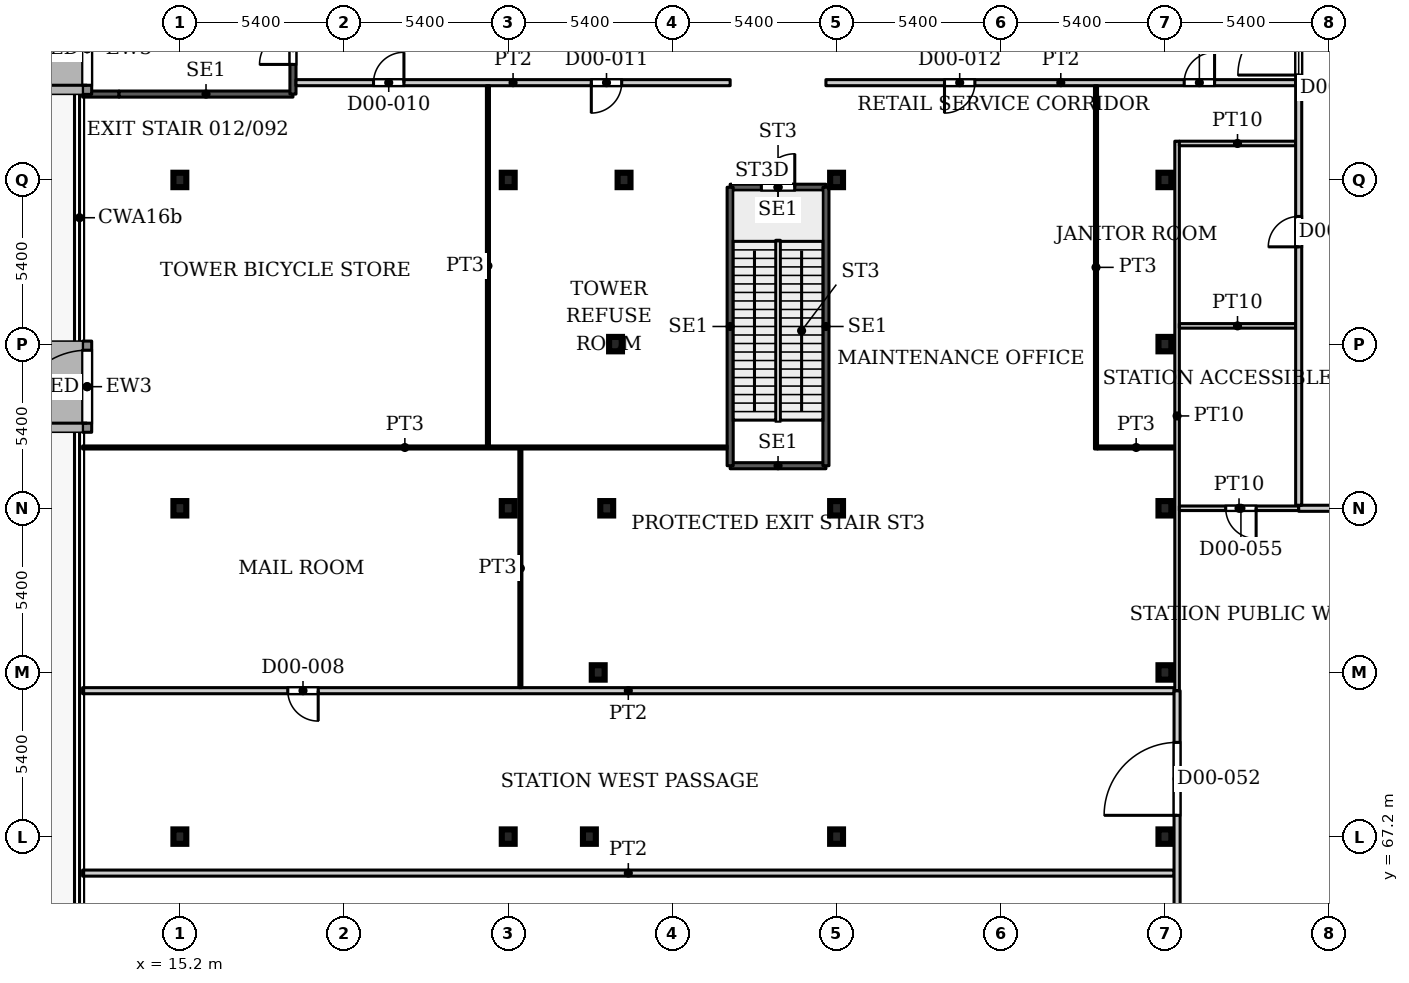
"""IFC4 building model, lengths in metres.
Left out: names, types, materials, properties, quantities, classifications, styles, units other than length and angle.
Written with IfcOpenShell. Run it as: python <this file> out.ifc"""

import sys

from ifc_helpers import new_model, si_unit, direction, frame, frame_2d, origin, origin_2d, place, context, subcontext, project, spatial, rectangle, i_section, extrude, source, transform, mapped, element, fill, save


model = new_model("IFC4")
c1 = context("Model", 3, precision=1e-05, world=origin(), true_north=direction((0.0, 1.0)))
c2 = subcontext(c1, "Body", "Model", "MODEL_VIEW")
j1 = project(units=[si_unit("LENGTHUNIT", "METRE"), si_unit("PLANEANGLEUNIT", "RADIAN")], contexts=[c1])
p1 = place(None, origin())
s1 = spatial("IfcSite", under=j1, at=p1, CompositionType="ELEMENT")
p2 = place(p1, origin())
s2 = spatial("IfcBuilding", under=s1, at=p2, CompositionType="ELEMENT")
p3 = place(p2, origin())
s3 = spatial("IfcBuildingStorey", under=s2, at=p3, CompositionType="ELEMENT", Elevation=0.0)
for number, where, z_axis, x_axis in (
    (1, (15.2, 67.2, 0.0), (0.0, 0.0, 1.0), (1.0, 0.0, 0.0)),
    (2, (26.0, 67.2, 0.0), (0.0, 0.0, 1.0), (1.0, 0.0, 0.0)),
    (3, (36.8, 67.2, 0.0), (0.0, 0.0, 1.0), (1.0, 0.0, 0.0)),
    (4, (47.6, 67.2, 0.0), (0.0, 0.0, 1.0), (1.0, 0.0, 0.0)),
    (5, (15.2, 78.0, 0.0), (0.0, 0.0, 1.0), (1.0, 0.0, 0.0)),
    (6, (26.0, 78.0, 0.0), (0.0, 0.0, 1.0), (1.0, 0.0, 0.0)),
    (7, (36.8, 78.0, 0.0), (0.0, 0.0, 1.0), (1.0, 0.0, 0.0)),
    (8, (47.6, 78.0, 0.0), (0.0, 0.0, 1.0), (1.0, 0.0, 0.0)),
    (9, (15.2, 88.8, 0.0), (0.0, 0.0, 1.0), (1.0, 0.0, 0.0)),
    (10, (26.0, 88.8, 0.0), (0.0, 0.0, 1.0), (1.0, 0.0, 0.0)),
    (11, (36.8, 88.8, 0.0), (0.0, 0.0, 1.0), (1.0, 0.0, 0.0)),
    (12, (47.6, 88.8, 0.0), (0.0, 0.0, 1.0), (1.0, 0.0, 0.0)),
    (13, (28.67, 67.2, 0.0), (0.0, 0.0, 1.0), (1.0, 0.0, 0.0)),
    (14, (28.96, 72.6, 0.0), (0.0, 0.0, 1.0), (1.0, 0.0, 0.0)),
    (15, (47.6, 72.6, 0.0), (0.0, 0.0, 1.0), (1.0, 0.0, 0.0)),
    (16, (29.24, 78.0, 0.0), (0.0, 0.0, 1.0), (1.0, 0.0, 0.0)),
    (17, (29.53, 83.4, 0.0), (0.0, 0.0, 1.0), (1.0, 0.0, 0.0)),
    (18, (47.6, 83.4, 0.0), (0.0, 0.0, 1.0), (1.0, 0.0, 0.0)),
    (19, (29.81, 88.8, 0.0), (0.0, 0.0, 1.0), (1.0, 0.0, 0.0)),
):
    element("IfcColumn", number, at=place(p3, frame(where, z_axis=z_axis, x_axis=x_axis)), inside=s3, PredefinedType="COLUMN", context=c2, shape_type="SweptSolid", body=[
        extrude(i_section(OverallWidth=0.424, OverallDepth=0.474, WebThickness=0.048, FlangeThickness=0.077, FilletRadius=0.014, at=origin_2d()), origin(), (0.0, 0.0, 1.0), 7.5),
    ])
p4 = place(p3, frame((12.15, 80.5, 0.0), z_axis=(0.0, 0.0, 1.0), x_axis=(0.0, 1.0, 0.0)))
e20 = element("IfcWall", 20, at=p4, inside=s3, PredefinedType="SOLIDWALL", context=c2, shape_type="SweptSolid", body=[
    extrude(rectangle(XDim=3.0, YDim=0.3, at=frame_2d((1.5, 0.0))), origin(), (0.0, 0.0, 1.0), 7.25),
])
p5 = place(p4, frame((0.3, 0.0, 0.0)))
e21 = element("IfcOpeningElement", 21, at=p5, cuts=e20, PredefinedType="OPENING", context=c2, shape_type="SweptSolid", body=[
    extrude(rectangle(XDim=2.4, YDim=2.7, at=frame_2d((1.2, 1.35))), frame((0.0, 0.16, 0.0), z_axis=(0.0, -1.0, 0.0), x_axis=(1.0, 0.0, 0.0)), (0.0, 0.0, 1.0), 0.32),
])
p6 = place(p3, frame((12.15, 91.615, 0.0), z_axis=(0.0, 0.0, 1.0), x_axis=(0.0, 1.0, 0.0)))
e22 = element("IfcWall", 22, at=p6, inside=s3, PredefinedType="SOLIDWALL", context=c2, shape_type="SweptSolid", body=[
    extrude(rectangle(XDim=3.0, YDim=0.3, at=frame_2d((1.5, 0.0))), origin(), (0.0, 0.0, 1.0), 7.25),
])
p7 = place(p6, frame((0.3, 0.0, 0.0)))
e23 = element("IfcOpeningElement", 23, at=p7, cuts=e22, PredefinedType="OPENING", context=c2, shape_type="SweptSolid", body=[
    extrude(rectangle(XDim=2.4, YDim=2.7, at=frame_2d((1.2, 1.35))), frame((0.0, 0.16, 0.0), z_axis=(0.0, -1.0, 0.0), x_axis=(1.0, 0.0, 0.0)), (0.0, 0.0, 1.0), 0.32),
])
p8 = place(p3, frame((33.3, 79.4, 0.0), z_axis=(0.0, 0.0, 1.0), x_axis=(1.0, 0.0, 0.0)))
e24 = element("IfcWall", 24, at=p8, inside=s3, PredefinedType="SHEAR", context=c2, shape_type="SweptSolid", body=[
    extrude(rectangle(XDim=3.15, YDim=0.2, at=frame_2d((1.575, 0.0))), origin(), (0.0, 0.0, 1.0), 7.5),
])
p9 = place(p3, frame((33.3, 88.56, 0.0), z_axis=(0.0, 0.0, 1.0), x_axis=(1.0, 0.0, 0.0)))
e25 = element("IfcWall", 25, at=p9, inside=s3, PredefinedType="SHEAR", context=c2, shape_type="SweptSolid", body=[
    extrude(rectangle(XDim=3.15, YDim=0.2, at=frame_2d((1.575, 0.0))), origin(), (0.0, 0.0, 1.0), 7.5),
])
p10 = place(p9, frame((1.025, 0.0, 0.0)))
e26 = element("IfcOpeningElement", 26, at=p10, cuts=e25, PredefinedType="OPENING", context=c2, shape_type="SweptSolid", body=[
    extrude(rectangle(XDim=1.1, YDim=2.2, at=frame_2d((0.55, 1.1))), frame((0.0, 0.11, 0.0), z_axis=(0.0, -1.0, 0.0), x_axis=(1.0, 0.0, 0.0)), (0.0, 0.0, 1.0), 0.22),
])
for number, where, z_axis, x_axis in (
    (27, (33.3, 79.4, 0.0), (0.0, 0.0, 1.0), (0.0, 1.0, 0.0)),
    (28, (36.45, 79.4, 0.0), (0.0, 0.0, 1.0), (0.0, 1.0, 0.0)),
):
    element("IfcWall", number, at=place(p3, frame(where, z_axis=z_axis, x_axis=x_axis)), inside=s3, PredefinedType="SHEAR", context=c2, shape_type="SweptSolid", body=[
        extrude(rectangle(XDim=9.16, YDim=0.2, at=frame_2d((4.58, 0.0))), origin(), (0.0, 0.0, 1.0), 7.5),
    ])
p11 = place(p3, frame((12.0, 91.625, 0.0), z_axis=(0.0, 0.0, 1.0), x_axis=(1.0, 0.0, 0.0)))
e29 = element("IfcWall", 29, at=p11, inside=s3, PredefinedType="SHEAR", context=c2, shape_type="SweptSolid", body=[
    extrude(rectangle(XDim=1.2, YDim=0.2, at=frame_2d((0.6, 0.0))), origin(), (0.0, 0.0, 1.0), 7.5),
])
p12 = place(p3, frame((13.2, 91.625, 0.0), z_axis=(0.0, 0.0, 1.0), x_axis=(1.0, 0.0, 0.0)))
e30 = element("IfcWall", 30, at=p12, inside=s3, PredefinedType="SHEAR", context=c2, shape_type="SweptSolid", body=[
    extrude(rectangle(XDim=5.72, YDim=0.2, at=frame_2d((2.86, 0.0))), origin(), (0.0, 0.0, 1.0), 7.5),
])
p13 = place(p3, frame((18.92, 91.625, 0.0), z_axis=(0.0, 0.0, 1.0), x_axis=(0.0, 1.0, 0.0)))
e31 = element("IfcWall", 31, at=p13, inside=s3, PredefinedType="SHEAR", context=c2, shape_type="SweptSolid", body=[
    extrude(rectangle(XDim=3.15, YDim=0.2, at=frame_2d((1.575, 0.0))), origin(), (0.0, 0.0, 1.0), 7.5),
])
p14 = place(p13, frame((0.975, 0.0, 0.0)))
e32 = element("IfcOpeningElement", 32, at=p14, cuts=e31, PredefinedType="OPENING", context=c2, shape_type="SweptSolid", body=[
    extrude(rectangle(XDim=1.1, YDim=2.2, at=frame_2d((0.55, 1.1))), frame((0.0, 0.11, 0.0), z_axis=(0.0, -1.0, 0.0), x_axis=(1.0, 0.0, 0.0)), (0.0, 0.0, 1.0), 0.22),
])
p15 = place(p3, frame((12.0, 66.0, 0.0), z_axis=(0.0, 0.0, 1.0), x_axis=(1.0, 0.0, 0.0)))
e33 = element("IfcWall", 33, at=p15, inside=s3, PredefinedType="PARTITIONING", context=c2, shape_type="SweptSolid", body=[
    extrude(rectangle(XDim=35.9, YDim=0.2, at=frame_2d((17.95, 0.0))), origin(), (0.0, 0.0, 1.0), 7.08),
])
p16 = place(p3, frame((12.0, 72.0, 0.0), z_axis=(0.0, 0.0, 1.0), x_axis=(1.0, 0.0, 0.0)))
e34 = element("IfcWall", 34, at=p16, inside=s3, PredefinedType="PARTITIONING", context=c2, shape_type="SweptSolid", body=[
    extrude(rectangle(XDim=35.9, YDim=0.2, at=frame_2d((17.95, 0.0))), origin(), (0.0, 0.0, 1.0), 7.08),
])
p17 = place(p16, frame((6.75, 0.0, 0.0)))
e35 = element("IfcOpeningElement", 35, at=p17, cuts=e34, PredefinedType="OPENING", context=c2, shape_type="SweptSolid", body=[
    extrude(rectangle(XDim=1.0, YDim=2.1, at=frame_2d((0.5, 1.05))), frame((0.0, 0.11, 0.0), z_axis=(0.0, -1.0, 0.0), x_axis=(1.0, 0.0, 0.0)), (0.0, 0.0, 1.0), 0.22),
])
p18 = place(p3, frame((12.0, 80.0, 0.0), z_axis=(0.0, 0.0, 1.0), x_axis=(1.0, 0.0, 0.0)))
e36 = element("IfcWall", 36, at=p18, inside=s3, PredefinedType="PARTITIONING", context=c2, shape_type="SweptSolid", body=[
    extrude(rectangle(XDim=21.201, YDim=0.1, at=frame_2d((10.601, 0.0))), origin(), (0.0, 0.0, 1.0), 7.08),
])
p19 = place(p3, frame((19.019, 92.0, 0.0), z_axis=(0.0, 0.0, 1.0), x_axis=(1.0, 0.0, 0.0)))
e37 = element("IfcWall", 37, at=p19, inside=s3, PredefinedType="PARTITIONING", context=c2, shape_type="SweptSolid", body=[
    extrude(rectangle(XDim=14.281, YDim=0.2, at=frame_2d((7.141, 0.0))), origin(), (0.0, 0.0, 1.0), 7.08),
])
p20 = place(p19, frame((2.551, 0.0, 0.0)))
e38 = element("IfcOpeningElement", 38, at=p20, cuts=e37, PredefinedType="OPENING", context=c2, shape_type="SweptSolid", body=[
    extrude(rectangle(XDim=1.0, YDim=2.1, at=frame_2d((0.5, 1.05))), frame((0.0, 0.11, 0.0), z_axis=(0.0, -1.0, 0.0), x_axis=(1.0, 0.0, 0.0)), (0.0, 0.0, 1.0), 0.22),
])
p21 = place(p19, frame((9.714, 0.0, 0.0)))
e39 = element("IfcOpeningElement", 39, at=p21, cuts=e37, PredefinedType="OPENING", context=c2, shape_type="SweptSolid", body=[
    extrude(rectangle(XDim=1.0, YDim=2.1, at=frame_2d((0.5, 1.05))), frame((0.0, 0.11, 0.0), z_axis=(0.0, -1.0, 0.0), x_axis=(1.0, 0.0, 0.0)), (0.0, 0.0, 1.0), 0.22),
])
p22 = place(p3, frame((25.333, 80.05, 0.0), z_axis=(0.0, 0.0, 1.0), x_axis=(0.0, 1.0, 0.0)))
e40 = element("IfcWall", 40, at=p22, inside=s3, PredefinedType="PARTITIONING", context=c2, shape_type="SweptSolid", body=[
    extrude(rectangle(XDim=11.85, YDim=0.1, at=frame_2d((5.925, 0.0))), origin(), (0.0, 0.0, 1.0), 7.08),
])
p23 = place(p3, frame((26.4, 72.1, 0.0), z_axis=(0.0, 0.0, 1.0), x_axis=(0.0, 1.0, 0.0)))
e41 = element("IfcWall", 41, at=p23, inside=s3, PredefinedType="PARTITIONING", context=c2, shape_type="SweptSolid", body=[
    extrude(rectangle(XDim=7.85, YDim=0.1, at=frame_2d((3.925, 0.0))), origin(), (0.0, 0.0, 1.0), 7.08),
])
p24 = place(p3, frame((36.45, 92.0, 0.0), z_axis=(0.0, 0.0, 1.0), x_axis=(1.0, 0.0, 0.0)))
e42 = element("IfcWall", 42, at=p24, inside=s3, PredefinedType="PARTITIONING", context=c2, shape_type="SweptSolid", body=[
    extrude(rectangle(XDim=15.45, YDim=0.2, at=frame_2d((7.725, 0.0))), origin(), (0.0, 0.0, 1.0), 7.08),
])
p25 = place(p24, frame((3.9, 0.0, 0.0)))
e43 = element("IfcOpeningElement", 43, at=p25, cuts=e42, PredefinedType="OPENING", context=c2, shape_type="SweptSolid", body=[
    extrude(rectangle(XDim=1.0, YDim=2.1, at=frame_2d((0.5, 1.05))), frame((0.0, 0.11, 0.0), z_axis=(0.0, -1.0, 0.0), x_axis=(1.0, 0.0, 0.0)), (0.0, 0.0, 1.0), 0.22),
])
p26 = place(p24, frame((11.783, 0.0, 0.0)))
e44 = element("IfcOpeningElement", 44, at=p26, cuts=e42, PredefinedType="OPENING", context=c2, shape_type="SweptSolid", body=[
    extrude(rectangle(XDim=1.0, YDim=2.1, at=frame_2d((0.5, 1.05))), frame((0.0, 0.11, 0.0), z_axis=(0.0, -1.0, 0.0), x_axis=(1.0, 0.0, 0.0)), (0.0, 0.0, 1.0), 0.22),
])
p27 = place(p3, frame((45.333, 79.95, 0.0), z_axis=(0.0, 0.0, 1.0), x_axis=(0.0, 1.0, 0.0)))
e45 = element("IfcWall", 45, at=p27, inside=s3, PredefinedType="PARTITIONING", context=c2, shape_type="SweptSolid", body=[
    extrude(rectangle(XDim=11.95, YDim=0.1, at=frame_2d((5.975, 0.0))), origin(), (0.0, 0.0, 1.0), 7.08),
])
p28 = place(p3, frame((45.383, 80.0, 0.0), z_axis=(0.0, 0.0, 1.0), x_axis=(1.0, 0.0, 0.0)))
e46 = element("IfcWall", 46, at=p28, inside=s3, PredefinedType="PARTITIONING", context=c2, shape_type="SweptSolid", body=[
    extrude(rectangle(XDim=2.542, YDim=0.1, at=frame_2d((1.271, 0.0))), origin(), (0.0, 0.0, 1.0), 7.08),
])
p29 = place(p3, frame((48.0, 42.1, 0.0), z_axis=(0.0, 0.0, 1.0), x_axis=(0.0, 1.0, 0.0)))
e47 = element("IfcWall", 47, at=p29, inside=s3, PredefinedType="PARTITIONING", context=c2, shape_type="SweptSolid", body=[
    extrude(rectangle(XDim=29.9, YDim=0.2, at=frame_2d((14.95, 0.0))), origin(), (0.0, 0.0, 1.0), 7.08),
])
p30 = place(p29, frame((25.8, 0.0, 0.0)))
e48 = element("IfcOpeningElement", 48, at=p30, cuts=e47, PredefinedType="OPENING", context=c2, shape_type="SweptSolid", body=[
    extrude(rectangle(XDim=2.4, YDim=2.1, at=frame_2d((1.2, 1.05))), frame((0.0, 0.11, 0.0), z_axis=(0.0, -1.0, 0.0), x_axis=(1.0, 0.0, 0.0)), (0.0, 0.0, 1.0), 0.22),
])
p31 = place(p3, frame((48.0, 72.0, 0.0), z_axis=(0.0, 0.0, 1.0), x_axis=(0.0, 1.0, 0.0)))
e49 = element("IfcWall", 49, at=p31, inside=s3, PredefinedType="PARTITIONING", context=c2, shape_type="SweptSolid", body=[
    extrude(rectangle(XDim=18.075, YDim=0.15, at=frame_2d((9.038, 0.0))), origin(), (0.0, 0.0, 1.0), 7.08),
])
p32 = place(p3, frame((48.075, 78.0, 0.0), z_axis=(0.0, 0.0, 1.0), x_axis=(1.0, 0.0, 0.0)))
e50 = element("IfcWall", 50, at=p32, inside=s3, PredefinedType="PARTITIONING", context=c2, shape_type="SweptSolid", body=[
    extrude(rectangle(XDim=3.925, YDim=0.15, at=frame_2d((1.962, 0.0))), origin(), (0.0, 0.0, 1.0), 7.08),
])
p33 = place(p32, frame((1.525, 0.0, 0.0)))
e51 = element("IfcOpeningElement", 51, at=p33, cuts=e50, PredefinedType="OPENING", context=c2, shape_type="SweptSolid", body=[
    extrude(rectangle(XDim=1.0, YDim=2.1, at=frame_2d((0.5, 1.05))), frame((0.0, 0.085, 0.0), z_axis=(0.0, -1.0, 0.0), x_axis=(1.0, 0.0, 0.0)), (0.0, 0.0, 1.0), 0.17),
])
for number, where, z_axis, x_axis in (
    (52, (48.075, 84.0, 0.0), (0.0, 0.0, 1.0), (1.0, 0.0, 0.0)),
    (53, (48.075, 90.0, 0.0), (0.0, 0.0, 1.0), (1.0, 0.0, 0.0)),
):
    element("IfcWall", number, at=place(p3, frame(where, z_axis=z_axis, x_axis=x_axis)), inside=s3, PredefinedType="PARTITIONING", context=c2, shape_type="SweptSolid", body=[
        extrude(rectangle(XDim=3.825, YDim=0.15, at=frame_2d((1.913, 0.0))), origin(), (0.0, 0.0, 1.0), 7.08),
    ])
p34 = place(p3, frame((52.0, 78.0, 0.0), z_axis=(0.0, 0.0, 1.0), x_axis=(1.0, 0.0, 0.0)))
e54 = element("IfcWall", 54, at=p34, inside=s3, PredefinedType="PARTITIONING", context=c2, shape_type="SweptSolid", body=[
    extrude(rectangle(XDim=15.9, YDim=0.2, at=frame_2d((7.95, 0.0))), origin(), (0.0, 0.0, 1.0), 7.08),
])
p35 = place(p34, frame((1.9, 0.0, 0.0)))
e55 = element("IfcOpeningElement", 55, at=p35, cuts=e54, PredefinedType="OPENING", context=c2, shape_type="SweptSolid", body=[
    extrude(rectangle(XDim=2.4, YDim=2.1, at=frame_2d((1.2, 1.05))), frame((0.0, 0.11, 0.0), z_axis=(0.0, -1.0, 0.0), x_axis=(1.0, 0.0, 0.0)), (0.0, 0.0, 1.0), 0.22),
])
p36 = place(p3, frame((52.0, 78.1, 0.0), z_axis=(0.0, 0.0, 1.0), x_axis=(0.0, 1.0, 0.0)))
e56 = element("IfcWall", 56, at=p36, inside=s3, PredefinedType="PARTITIONING", context=c2, shape_type="SweptSolid", body=[
    extrude(rectangle(XDim=31.9, YDim=0.2, at=frame_2d((15.95, 0.0))), origin(), (0.0, 0.0, 1.0), 7.08),
])
p37 = place(p36, frame((14.15, 0.0, 0.0)))
e57 = element("IfcOpeningElement", 57, at=p37, cuts=e56, PredefinedType="OPENING", context=c2, shape_type="SweptSolid", body=[
    extrude(rectangle(XDim=2.0, YDim=2.1, at=frame_2d((1.0, 1.05))), frame((0.0, 0.11, 0.0), z_axis=(0.0, -1.0, 0.0), x_axis=(1.0, 0.0, 0.0)), (0.0, 0.0, 1.0), 0.22),
])
p38 = place(p36, frame((8.5, 0.0, 0.0)))
e58 = element("IfcOpeningElement", 58, at=p38, cuts=e56, PredefinedType="OPENING", context=c2, shape_type="SweptSolid", body=[
    extrude(rectangle(XDim=1.0, YDim=2.1, at=frame_2d((0.5, 1.05))), frame((0.0, 0.11, 0.0), z_axis=(0.0, -1.0, 0.0), x_axis=(1.0, 0.0, 0.0)), (0.0, 0.0, 1.0), 0.22),
])
m1 = source(origin(), c2, "Body", "SweptSolid", [
    extrude(rectangle(XDim=2.4, YDim=2.7, at=frame_2d((1.2, 1.35))), frame((0.0, 0.025, 0.0), z_axis=(0.0, -1.0, 0.0), x_axis=(1.0, 0.0, 0.0)), (0.0, 0.0, 1.0), 0.05),
])
p39 = place(p5, origin())
e59 = element("IfcDoor", 59, at=p39, inside=s3, OperationType="DOUBLE_DOOR_SINGLE_SWING", PredefinedType="DOOR", context=c2, shape_type="MappedRepresentation", body=[
    mapped(m1, transform((0.0, 0.0, 0.0), x_axis=(1.0, 0.0, 0.0), y_axis=(0.0, 1.0, 0.0), z_axis=(0.0, 0.0, 1.0), scale=1.0)),
])
fill(e21, e59)
p40 = place(p7, origin())
e60 = element("IfcDoor", 60, at=p40, inside=s3, OperationType="DOUBLE_DOOR_SINGLE_SWING", PredefinedType="DOOR", context=c2, shape_type="MappedRepresentation", body=[
    mapped(m1, transform((0.0, 0.0, 0.0), x_axis=(1.0, 0.0, 0.0), y_axis=(0.0, 1.0, 0.0), z_axis=(0.0, 0.0, 1.0), scale=1.0)),
])
fill(e23, e60)
m2 = source(origin(), c2, "Body", "SweptSolid", [
    extrude(rectangle(XDim=1.1, YDim=2.2, at=frame_2d((0.55, 1.1))), frame((0.0, 0.025, 0.0), z_axis=(0.0, -1.0, 0.0), x_axis=(1.0, 0.0, 0.0)), (0.0, 0.0, 1.0), 0.05),
])
p41 = place(p14, origin())
e61 = element("IfcDoor", 61, at=p41, inside=s3, OperationType="SINGLE_SWING_LEFT", PredefinedType="DOOR", context=c2, shape_type="MappedRepresentation", body=[
    mapped(m2, transform((0.0, 0.0, 0.0), x_axis=(1.0, 0.0, 0.0), y_axis=(0.0, 1.0, 0.0), z_axis=(0.0, 0.0, 1.0), scale=1.0)),
])
fill(e32, e61)
p42 = place(p10, origin())
e62 = element("IfcDoor", 62, at=p42, inside=s3, OperationType="SINGLE_SWING_LEFT", PredefinedType="DOOR", context=c2, shape_type="MappedRepresentation", body=[
    mapped(m2, transform((0.0, 0.0, 0.0), x_axis=(1.0, 0.0, 0.0), y_axis=(0.0, 1.0, 0.0), z_axis=(0.0, 0.0, 1.0), scale=1.0)),
])
fill(e26, e62)
m3 = source(origin(), c2, "Body", "SweptSolid", [
    extrude(rectangle(XDim=1.0, YDim=2.1, at=frame_2d((0.5, 1.05))), frame((0.0, 0.025, 0.0), z_axis=(0.0, -1.0, 0.0), x_axis=(1.0, 0.0, 0.0)), (0.0, 0.0, 1.0), 0.05),
])
p43 = place(p17, origin())
e63 = element("IfcDoor", 63, at=p43, inside=s3, OperationType="SINGLE_SWING_RIGHT", PredefinedType="DOOR", context=c2, shape_type="MappedRepresentation", body=[
    mapped(m3, transform((0.0, 0.0, 0.0), x_axis=(1.0, 0.0, 0.0), y_axis=(0.0, 1.0, 0.0), z_axis=(0.0, 0.0, 1.0), scale=1.0)),
])
fill(e35, e63)
p44 = place(p20, origin())
e64 = element("IfcDoor", 64, at=p44, inside=s3, OperationType="SINGLE_SWING_LEFT", PredefinedType="DOOR", context=c2, shape_type="MappedRepresentation", body=[
    mapped(m3, transform((0.0, 0.0, 0.0), x_axis=(1.0, 0.0, 0.0), y_axis=(0.0, 1.0, 0.0), z_axis=(0.0, 0.0, 1.0), scale=1.0)),
])
fill(e38, e64)
p45 = place(p21, origin())
e65 = element("IfcDoor", 65, at=p45, inside=s3, OperationType="SINGLE_SWING_RIGHT", PredefinedType="DOOR", context=c2, shape_type="MappedRepresentation", body=[
    mapped(m3, transform((0.0, 0.0, 0.0), x_axis=(1.0, 0.0, 0.0), y_axis=(0.0, 1.0, 0.0), z_axis=(0.0, 0.0, 1.0), scale=1.0)),
])
fill(e39, e65)
p46 = place(p25, origin())
e66 = element("IfcDoor", 66, at=p46, inside=s3, OperationType="SINGLE_SWING_RIGHT", PredefinedType="DOOR", context=c2, shape_type="MappedRepresentation", body=[
    mapped(m3, transform((0.0, 0.0, 0.0), x_axis=(1.0, 0.0, 0.0), y_axis=(0.0, 1.0, 0.0), z_axis=(0.0, 0.0, 1.0), scale=1.0)),
])
fill(e43, e66)
p47 = place(p26, origin())
e67 = element("IfcDoor", 67, at=p47, inside=s3, OperationType="SINGLE_SWING_LEFT", PredefinedType="DOOR", context=c2, shape_type="MappedRepresentation", body=[
    mapped(m3, transform((0.0, 0.0, 0.0), x_axis=(1.0, 0.0, 0.0), y_axis=(0.0, 1.0, 0.0), z_axis=(0.0, 0.0, 1.0), scale=1.0)),
])
fill(e44, e67)
m4 = source(origin(), c2, "Body", "SweptSolid", [
    extrude(rectangle(XDim=2.0, YDim=2.1, at=frame_2d((1.0, 1.05))), frame((0.0, 0.025, 0.0), z_axis=(0.0, -1.0, 0.0), x_axis=(1.0, 0.0, 0.0)), (0.0, 0.0, 1.0), 0.05),
])
p48 = place(p37, origin())
e68 = element("IfcDoor", 68, at=p48, inside=s3, OperationType="DOUBLE_DOOR_SINGLE_SWING", PredefinedType="DOOR", context=c2, shape_type="MappedRepresentation", body=[
    mapped(m4, transform((0.0, 0.0, 0.0), x_axis=(1.0, 0.0, 0.0), y_axis=(0.0, 1.0, 0.0), z_axis=(0.0, 0.0, 1.0), scale=1.0)),
])
fill(e57, e68)
m5 = source(origin(), c2, "Body", "SweptSolid", [
    extrude(rectangle(XDim=2.4, YDim=2.1, at=frame_2d((1.2, 1.05))), frame((0.0, 0.025, 0.0), z_axis=(0.0, -1.0, 0.0), x_axis=(1.0, 0.0, 0.0)), (0.0, 0.0, 1.0), 0.05),
])
p49 = place(p30, origin())
e69 = element("IfcDoor", 69, at=p49, inside=s3, OperationType="DOUBLE_DOOR_SINGLE_SWING", PredefinedType="DOOR", context=c2, shape_type="MappedRepresentation", body=[
    mapped(m5, transform((0.0, 0.0, 0.0), x_axis=(1.0, 0.0, 0.0), y_axis=(0.0, 1.0, 0.0), z_axis=(0.0, 0.0, 1.0), scale=1.0)),
])
fill(e48, e69)
p50 = place(p38, origin())
e70 = element("IfcDoor", 70, at=p50, inside=s3, OperationType="SINGLE_SWING_LEFT", PredefinedType="DOOR", context=c2, shape_type="MappedRepresentation", body=[
    mapped(m3, transform((0.0, 0.0, 0.0), x_axis=(1.0, 0.0, 0.0), y_axis=(0.0, 1.0, 0.0), z_axis=(0.0, 0.0, 1.0), scale=1.0)),
])
fill(e58, e70)
m6 = source(origin(), c2, "Body", "SweptSolid", [
    extrude(rectangle(XDim=1.0, YDim=2.1, at=frame_2d((0.5, 1.05))), frame((0.0, 0.025, 0.0), z_axis=(0.0, -1.0, 0.0), x_axis=(1.0, 0.0, 0.0)), (0.0, 0.0, 1.0), 0.05),
])
p51 = place(p33, origin())
e71 = element("IfcDoor", 71, at=p51, inside=s3, OperationType="SINGLE_SWING_RIGHT", PredefinedType="DOOR", context=c2, shape_type="MappedRepresentation", body=[
    mapped(m6, transform((0.0, 0.0, 0.0), x_axis=(1.0, 0.0, 0.0), y_axis=(0.0, 1.0, 0.0), z_axis=(0.0, 0.0, 1.0), scale=1.0)),
])
fill(e51, e71)
save(model, sys.argv[1])
